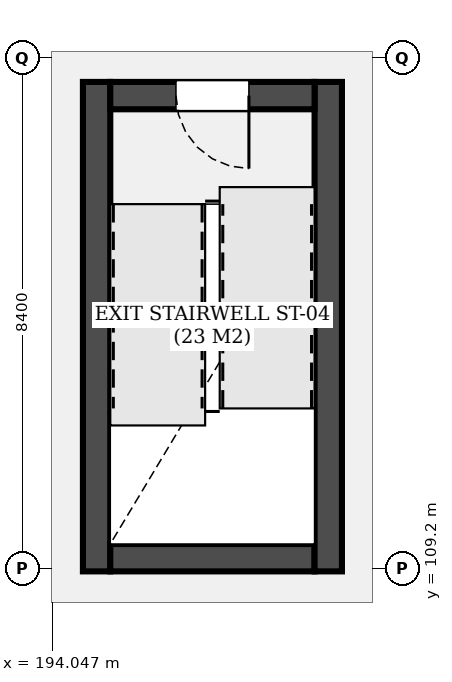
"""IFC4 building model, lengths in metres.
Left out: names, types, materials, properties, quantities, classifications, styles, units other than length and angle.
Written with IfcOpenShell. Run it as: python <this file> out.ifc"""

import sys

from ifc_helpers import new_model, si_unit, direction, frame, frame_2d, origin, place, context, subcontext, project, spatial, rectangle, extrude, element, fill, save


model = new_model("IFC4")
c1 = context("Model", 3, precision=1e-05, world=origin(), true_north=direction((0.0, 1.0)))
c2 = subcontext(c1, "Body", "Model", "MODEL_VIEW")
j1 = project(units=[si_unit("LENGTHUNIT", "METRE"), si_unit("PLANEANGLEUNIT", "RADIAN")], contexts=[c1])
p1 = place(None, origin())
s1 = spatial("IfcSite", under=j1, at=p1, CompositionType="ELEMENT")
p2 = place(p1, origin())
s2 = spatial("IfcBuilding", under=s1, at=p2, CompositionType="ELEMENT")
p3 = place(p2, frame((0.0, 0.0, 5.1)))
s3 = spatial("IfcBuildingStorey", under=s2, at=p3, CompositionType="ELEMENT", Elevation=5.1)
p4 = place(p3, frame((194.775, 117.2, 0.0), z_axis=(0.0, 0.0, 1.0), x_axis=(0.0, -1.0, 0.0)))
e1 = element("IfcWall", 1, at=p4, inside=s3, PredefinedType="SHEAR", context=c2, shape_type="SweptSolid", body=[
    extrude(rectangle(XDim=8.05, YDim=0.45, at=frame_2d((4.025, 0.0))), origin(), (0.0, 0.0, 1.0), 4.8),
])
p5 = place(p3, frame((195.0, 109.375, 0.0), z_axis=(0.0, 0.0, 1.0), x_axis=(1.0, 0.0, 0.0)))
e2 = element("IfcWall", 2, at=p5, inside=s3, PredefinedType="SHEAR", context=c2, shape_type="SweptSolid", body=[
    extrude(rectangle(XDim=3.36, YDim=0.45, at=frame_2d((1.68, 0.0))), origin(), (0.0, 0.0, 1.0), 4.8),
])
p6 = place(p3, frame((198.585, 109.15, 0.0), z_axis=(0.0, 0.0, 1.0), x_axis=(0.0, 1.0, 0.0)))
e3 = element("IfcWall", 3, at=p6, inside=s3, PredefinedType="SHEAR", context=c2, shape_type="SweptSolid", body=[
    extrude(rectangle(XDim=8.05, YDim=0.45, at=frame_2d((4.025, 0.0))), origin(), (0.0, 0.0, 1.0), 4.8),
])
p7 = place(p3, frame((198.36, 116.975, 0.0), z_axis=(0.0, 0.0, 1.0), x_axis=(-1.0, 0.0, 0.0)))
e4 = element("IfcWall", 4, at=p7, inside=s3, PredefinedType="SHEAR", context=c2, shape_type="SweptSolid", body=[
    extrude(rectangle(XDim=3.36, YDim=0.45, at=frame_2d((1.68, 0.0))), origin(), (0.0, 0.0, 1.0), 4.8),
])
p8 = place(p7, frame((1.08, 0.0, 0.0)))
e5 = element("IfcOpeningElement", 5, at=p8, cuts=e4, PredefinedType="OPENING", context=c2, shape_type="SweptSolid", body=[
    extrude(rectangle(XDim=1.2, YDim=2.2, at=frame_2d((0.6, 1.1))), frame((0.0, 0.235, 0.0), z_axis=(0.0, -1.0, 0.0), x_axis=(1.0, 0.0, 0.0)), (0.0, 0.0, 1.0), 0.47),
])
p9 = place(p8, origin())
e6 = element("IfcDoor", 6, at=p9, inside=s3, OperationType="SINGLE_SWING_LEFT", PredefinedType="DOOR", context=c2, shape_type="SweptSolid", body=[
    extrude(rectangle(XDim=1.2, YDim=2.2, at=frame_2d((0.6, 1.1))), frame((0.0, 0.025, 0.0), z_axis=(0.0, -1.0, 0.0), x_axis=(1.0, 0.0, 0.0)), (0.0, 0.0, 1.0), 0.05),
])
fill(e5, e6)
save(model, sys.argv[1])
